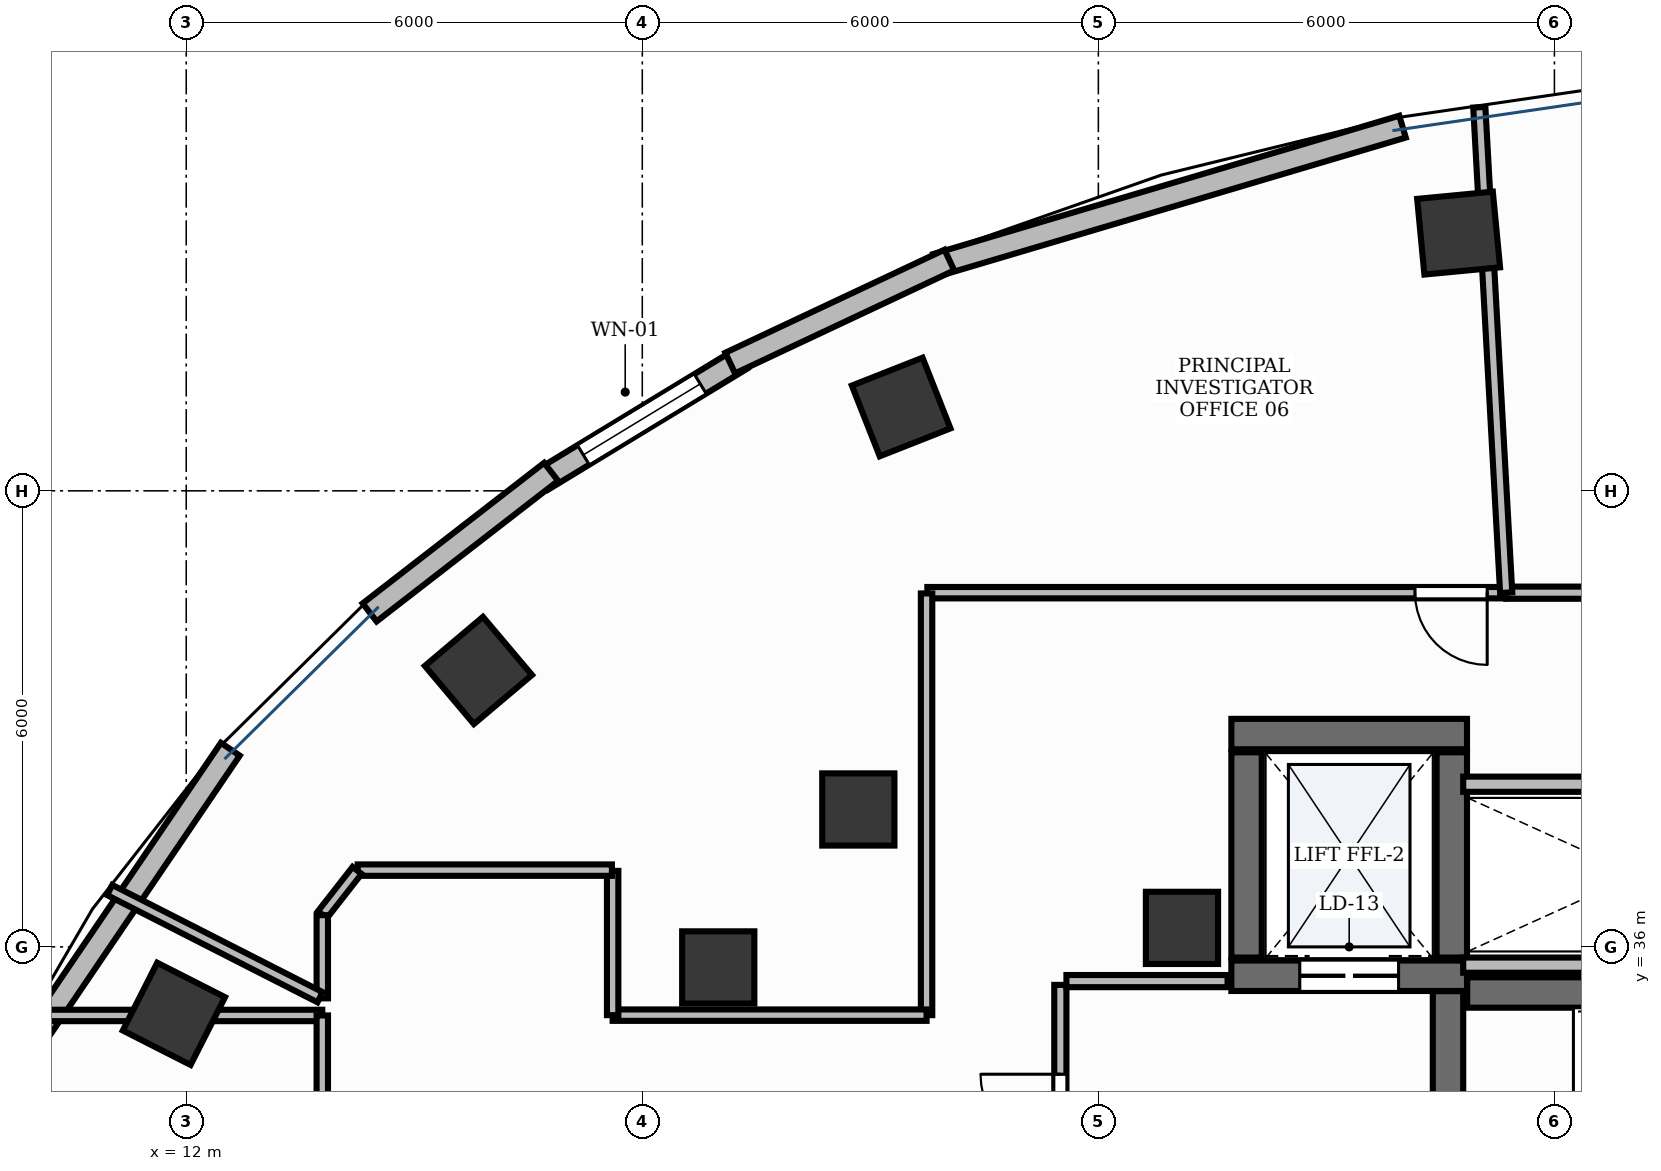
"""IFC4 building model, lengths in metres.
Left out: names, types, materials, properties, quantities, classifications, styles, units other than length and angle.
Written with IfcOpenShell. Run it as: python <this file> out.ifc"""

import sys

from ifc_helpers import new_model, si_unit, direction, frame, frame_2d, origin, origin_2d, place, context, subcontext, project, spatial, rectangle, extrude, element, fill, save


model = new_model("IFC4")
c1 = context("Model", 3, precision=1e-05, world=origin(), true_north=direction((0.0, 1.0)))
c2 = subcontext(c1, "Body", "Model", "MODEL_VIEW")
j1 = project(units=[si_unit("LENGTHUNIT", "METRE"), si_unit("PLANEANGLEUNIT", "RADIAN")], contexts=[c1])
p1 = place(None, origin())
s1 = spatial("IfcSite", under=j1, at=p1, CompositionType="ELEMENT")
p2 = place(p1, origin())
s2 = spatial("IfcBuilding", under=s1, at=p2, CompositionType="ELEMENT")
p3 = place(p2, frame((0.0, 0.0, 179.4)))
s3 = spatial("IfcBuildingStorey", under=s2, at=p3, CompositionType="ELEMENT", Elevation=179.4)
p4 = place(p3, frame((28.852, 35.4, 0.0), z_axis=(0.0, 0.0, 1.0), x_axis=(1.0, 0.0, 0.0)))
e1 = element("IfcWall", 1, at=p4, inside=s3, PredefinedType="SHEAR", context=c2, shape_type="SweptSolid", body=[
    extrude(rectangle(XDim=8.198, YDim=0.4, at=frame_2d((4.099, 0.0))), origin(), (0.0, 0.0, 1.0), 3.9),
])
p5 = place(p3, frame((28.6, 32.11, 0.0), z_axis=(0.0, 0.0, 1.0), x_axis=(0.0, 1.0, 0.0)))
e2 = element("IfcWall", 2, at=p5, inside=s3, PredefinedType="SHEAR", context=c2, shape_type="SweptSolid", body=[
    extrude(rectangle(XDim=3.308, YDim=0.4, at=frame_2d((1.654, 0.0))), origin(), (0.0, 0.0, 1.0), 3.9),
])
p6 = place(p5, frame((0.2, 0.0, 0.0)))
e3 = element("IfcOpeningElement", 3, at=p6, cuts=e2, PredefinedType="OPENING", context=c2, shape_type="SweptSolid", body=[
    extrude(rectangle(XDim=1.05, YDim=2.15, at=frame_2d((0.525, 1.075))), frame((0.0, 0.215, 0.0), z_axis=(0.0, -1.0, 0.0), x_axis=(1.0, 0.0, 0.0)), (0.0, 0.0, 1.0), 0.43),
])
p7 = place(p3, frame((25.75, 38.8, 0.0), z_axis=(0.0, 0.0, 1.0), x_axis=(1.0, 0.0, 0.0)))
e4 = element("IfcWall", 4, at=p7, inside=s3, PredefinedType="SHEAR", context=c2, shape_type="SweptSolid", body=[
    extrude(rectangle(XDim=3.1, YDim=0.4, at=frame_2d((1.55, 0.0))), origin(), (0.0, 0.0, 1.0), 3.9),
])
p8 = place(p3, frame((25.75, 35.62, 0.0), z_axis=(0.0, 0.0, 1.0), x_axis=(1.0, 0.0, 0.0)))
e5 = element("IfcWall", 5, at=p8, inside=s3, PredefinedType="SHEAR", context=c2, shape_type="SweptSolid", body=[
    extrude(rectangle(XDim=3.1, YDim=0.4, at=frame_2d((1.55, 0.0))), origin(), (0.0, 0.0, 1.0), 3.9),
])
p9 = place(p8, frame((0.9, 0.0, 0.0)))
e6 = element("IfcOpeningElement", 6, at=p9, cuts=e5, PredefinedType="OPENING", context=c2, shape_type="SweptSolid", body=[
    extrude(rectangle(XDim=1.3, YDim=2.2, at=frame_2d((0.65, 1.1))), frame((0.0, 0.215, 0.0), z_axis=(0.0, -1.0, 0.0), x_axis=(1.0, 0.0, 0.0)), (0.0, 0.0, 1.0), 0.43),
])
for number, where, z_axis, x_axis in (
    (7, (25.95, 35.86, 0.0), (0.0, 0.0, 1.0), (0.0, 1.0, 0.0)),
    (8, (28.65, 35.86, 0.0), (0.0, 0.0, 1.0), (0.0, 1.0, 0.0)),
):
    element("IfcWall", number, at=place(p3, frame(where, z_axis=z_axis, x_axis=x_axis)), inside=s3, PredefinedType="SHEAR", context=c2, shape_type="SweptSolid", body=[
        extrude(rectangle(XDim=2.7, YDim=0.4, at=frame_2d((1.35, 0.0))), origin(), (0.0, 0.0, 1.0), 3.9),
    ])
p10 = place(p3, frame((25.1, 36.25, -0.0), z_axis=(0.0, 0.0, 1.0), x_axis=(1.0, 0.0, 0.0)))
e9 = element("IfcColumn", 9, at=p10, inside=s3, PredefinedType="PILASTER", context=c2, shape_type="SweptSolid", body=[
    extrude(rectangle(XDim=0.95, YDim=0.95, at=origin_2d()), origin(), (0.0, 0.0, 1.0), 3.901),
])
for number, where, z_axis, x_axis in (
    (10, (28.74, 45.39, -0.0), (0.0, 0.0, 1.0), (0.995, 0.095, 0.0)),
    (11, (21.406, 43.103, -0.0), (0.0, 0.0, 1.0), (0.93, 0.367, 0.0)),
    (12, (15.844, 39.637, -0.0), (0.0, 0.0, 1.0), (0.764, 0.645, 0.0)),
):
    element("IfcColumn", number, at=place(p3, frame(where, z_axis=z_axis, x_axis=x_axis)), inside=s3, PredefinedType="COLUMN", context=c2, shape_type="SweptSolid", body=[
        extrude(rectangle(XDim=1.0, YDim=1.0, at=origin_2d()), origin(), (0.0, 0.0, 1.0), 3.901),
    ])
p11 = place(p3, frame((20.842, 37.808, -0.0), z_axis=(0.0, 0.0, 1.0), x_axis=(1.0, 0.0, 0.0)))
e13 = element("IfcColumn", 13, at=p11, inside=s3, PredefinedType="COLUMN", context=c2, shape_type="SweptSolid", body=[
    extrude(rectangle(XDim=0.95, YDim=0.95, at=origin_2d()), origin(), (0.0, 0.0, 1.0), 3.901),
])
p12 = place(p3, frame((11.838, 35.119, -0.0), z_axis=(0.0, 0.0, 1.0), x_axis=(0.453057191132, 0.891481453292, 0.0)))
e14 = element("IfcColumn", 14, at=p12, inside=s3, PredefinedType="COLUMN", context=c2, shape_type="SweptSolid", body=[
    extrude(rectangle(XDim=1.0, YDim=1.0, at=origin_2d()), origin(), (0.0, 0.0, 1.0), 3.901),
])
p13 = place(p3, frame((19.0, 35.73, -0.0), z_axis=(0.0, 0.0, 1.0), x_axis=(1.0, 0.0, 0.0)))
e15 = element("IfcColumn", 15, at=p13, inside=s3, PredefinedType="COLUMN", context=c2, shape_type="SweptSolid", body=[
    extrude(rectangle(XDim=0.95, YDim=0.95, at=origin_2d()), origin(), (0.0, 0.0, 1.0), 3.901),
])
p14 = place(p3, frame((19.303, 43.736, 0.0), z_axis=(0.0, 0.0, 1.0), x_axis=(-0.85455658592, -0.519358297769, 0.0)))
e16 = element("IfcWall", 16, at=p14, inside=s3, PredefinedType="STANDARD", context=c2, shape_type="SweptSolid", body=[
    extrude(rectangle(XDim=3.066, YDim=0.3, at=frame_2d((1.533, 0.0))), origin(), (0.0, 0.0, 1.0), 3.9),
])
p15 = place(p14, frame((0.633, 0.0, 0.9)))
e17 = element("IfcOpeningElement", 17, at=p15, cuts=e16, PredefinedType="OPENING", context=c2, shape_type="SweptSolid", body=[
    extrude(rectangle(XDim=1.8, YDim=2.1, at=frame_2d((0.9, 1.05))), frame((0.0, 0.165, 0.0), z_axis=(0.0, -1.0, 0.0), x_axis=(1.0, 0.0, 0.0)), (0.0, 0.0, 1.0), 0.33),
])
p16 = place(p3, frame((28.002, 46.791, 0.0), z_axis=(0.0, 0.0, 1.0), x_axis=(-0.958672086524, -0.284513322218, 0.0)))
e18 = element("IfcWall", 18, at=p16, inside=s3, PredefinedType="STANDARD", context=c2, shape_type="SweptSolid", body=[
    extrude(rectangle(XDim=6.396, YDim=0.3, at=frame_2d((3.198, 0.0))), origin(), (0.0, 0.0, 1.0), 3.9),
])
p17 = place(p3, frame((22.04, 45.036, 0.0), z_axis=(0.0, 0.0, 1.0), x_axis=(-0.90504435143, -0.425317201561, 0.0)))
e19 = element("IfcWall", 19, at=p17, inside=s3, PredefinedType="STANDARD", context=c2, shape_type="SweptSolid", body=[
    extrude(rectangle(XDim=3.186, YDim=0.3, at=frame_2d((1.593, 0.0))), origin(), (0.0, 0.0, 1.0), 3.9),
])
p18 = place(p3, frame((16.8, 42.25, 0.0), z_axis=(0.0, 0.0, 1.0), x_axis=(-0.790530517055, -0.612422649488, 0.0)))
e20 = element("IfcWall", 20, at=p18, inside=s3, PredefinedType="STANDARD", context=c2, shape_type="SweptSolid", body=[
    extrude(rectangle(XDim=3.02, YDim=0.3, at=frame_2d((1.51, 0.0))), origin(), (0.0, 0.0, 1.0), 3.9),
])
p19 = place(p3, frame((12.58, 38.601, 0.0), z_axis=(0.0, 0.0, 1.0), x_axis=(-0.561663900064, -0.827365495634, 0.0)))
e21 = element("IfcWall", 21, at=p19, inside=s3, PredefinedType="STANDARD", context=c2, shape_type="SweptSolid", body=[
    extrude(rectangle(XDim=5.438, YDim=0.3, at=frame_2d((2.719, 0.0))), origin(), (0.0, 0.0, 1.0), 3.47),
])
for number, where, z_axis, x_axis in (
    (22, (28.8, 35.76, 0.0), (0.0, 0.0, 1.0), (1.0, 0.0, 0.0)),
    (23, (28.8, 38.14, 0.0), (0.0, 0.0, 1.0), (1.0, 0.0, 0.0)),
):
    element("IfcWall", number, at=place(p3, frame(where, z_axis=z_axis, x_axis=x_axis)), inside=s3, PredefinedType="PARTITIONING", context=c2, shape_type="SweptSolid", body=[
        extrude(rectangle(XDim=4.57, YDim=0.2, at=frame_2d((2.285, 0.0))), origin(), (0.0, 0.0, 1.0), 2.91),
    ])
p20 = place(p3, frame((23.5, 32.1, 0.0), z_axis=(0.0, 0.0, 1.0), x_axis=(0.0, 1.0, 0.0)))
e24 = element("IfcWall", 24, at=p20, inside=s3, PredefinedType="PARTITIONING", context=c2, shape_type="SweptSolid", body=[
    extrude(rectangle(XDim=3.4, YDim=0.16, at=frame_2d((1.7, 0.0))), origin(), (0.0, 0.0, 1.0), 2.91),
])
p21 = place(p20, frame((1.175, 0.0, 0.0)))
e25 = element("IfcOpeningElement", 25, at=p21, cuts=e24, PredefinedType="OPENING", context=c2, shape_type="SweptSolid", body=[
    extrude(rectangle(XDim=1.05, YDim=2.15, at=frame_2d((0.525, 1.075))), frame((0.0, 0.095, 0.0), z_axis=(0.0, -1.0, 0.0), x_axis=(1.0, 0.0, 0.0)), (0.0, 0.0, 1.0), 0.19),
])
p22 = place(p3, frame((23.58, 35.55, 0.0), z_axis=(0.0, 0.0, 1.0), x_axis=(1.0, 0.0, 0.0)))
e26 = element("IfcWall", 26, at=p22, inside=s3, PredefinedType="PARTITIONING", context=c2, shape_type="SweptSolid", body=[
    extrude(rectangle(XDim=2.12, YDim=0.16, at=frame_2d((1.06, 0.0))), origin(), (0.0, 0.0, 1.0), 2.91),
])
p23 = place(p3, frame((36.385, 40.66, 0.0), z_axis=(0.0, 0.0, 1.0), x_axis=(-1.0, 0.0, 0.0)))
e27 = element("IfcWall", 27, at=p23, inside=s3, PredefinedType="PARTITIONING", context=c2, shape_type="SweptSolid", body=[
    extrude(rectangle(XDim=7.019, YDim=0.16, at=frame_2d((3.51, 0.0))), origin(), (0.0, 0.0, 1.0), 2.91),
])
p24 = place(p23, frame((1.217, 0.0, 0.0)))
e28 = element("IfcOpeningElement", 28, at=p24, cuts=e27, PredefinedType="OPENING", context=c2, shape_type="SweptSolid", body=[
    extrude(rectangle(XDim=0.95, YDim=2.15, at=frame_2d((0.475, 1.075))), frame((0.0, 0.095, 0.0), z_axis=(0.0, -1.0, 0.0), x_axis=(1.0, 0.0, 0.0)), (0.0, 0.0, 1.0), 0.19),
])
p25 = place(p3, frame((29.355, 40.66, 0.0), z_axis=(0.0, 0.0, 1.0), x_axis=(-1.0, 0.0, 0.0)))
e29 = element("IfcWall", 29, at=p25, inside=s3, PredefinedType="PARTITIONING", context=c2, shape_type="SweptSolid", body=[
    extrude(rectangle(XDim=7.605, YDim=0.15, at=frame_2d((3.803, 0.0))), origin(), (0.0, 0.0, 1.0), 2.91),
])
p26 = place(p25, frame((0.24, 0.0, 0.0)))
e30 = element("IfcOpeningElement", 30, at=p26, cuts=e29, PredefinedType="OPENING", context=c2, shape_type="SweptSolid", body=[
    extrude(rectangle(XDim=0.95, YDim=2.15, at=frame_2d((0.475, 1.075))), frame((0.0, 0.09, 0.0), z_axis=(0.0, -1.0, 0.0), x_axis=(1.0, 0.0, 0.0)), (0.0, 0.0, 1.0), 0.18),
])
p27 = place(p3, frame((10.016, 35.098, 0.0), z_axis=(0.0, 0.0, 1.0), x_axis=(1.0, 0.0, 0.0)))
e31 = element("IfcWall", 31, at=p27, inside=s3, PredefinedType="PARTITIONING", context=c2, shape_type="SweptSolid", body=[
    extrude(rectangle(XDim=3.774, YDim=0.15, at=frame_2d((1.887, 0.0))), origin(), (0.0, 0.0, 1.0), 2.91),
])
p28 = place(p3, frame((13.79, 35.098, 0.0), z_axis=(0.0, 0.0, 1.0), x_axis=(0.0, -1.0, 0.0)))
e32 = element("IfcWall", 32, at=p28, inside=s3, PredefinedType="PARTITIONING", context=c2, shape_type="SweptSolid", body=[
    extrude(rectangle(XDim=3.088, YDim=0.15, at=frame_2d((1.544, 0.0))), origin(), (0.0, 0.0, 1.0), 2.91),
])
p29 = place(p3, frame((29.365, 40.66, 0.0), z_axis=(0.0, 0.0, 1.0), x_axis=(-0.055309349604, 0.99846926635, 0.0)))
e33 = element("IfcWall", 33, at=p29, inside=s3, PredefinedType="PARTITIONING", context=c2, shape_type="SweptSolid", body=[
    extrude(rectangle(XDim=6.396, YDim=0.16, at=frame_2d((3.198, 0.0))), origin(), (0.0, 0.0, 1.0), 2.91),
])
p30 = place(p3, frame((21.74, 40.65, 0.0), z_axis=(0.0, 0.0, 1.0), x_axis=(0.0, -1.0, 0.0)))
e34 = element("IfcWall", 34, at=p30, inside=s3, PredefinedType="PARTITIONING", context=c2, shape_type="SweptSolid", body=[
    extrude(rectangle(XDim=5.548, YDim=0.15, at=frame_2d((2.774, 0.0))), origin(), (0.0, 0.0, 1.0), 2.91),
])
p31 = place(p3, frame((21.74, 35.102, 0.0), z_axis=(0.0, 0.0, 1.0), x_axis=(-1.0, 0.0, 0.0)))
e35 = element("IfcWall", 35, at=p31, inside=s3, PredefinedType="PARTITIONING", context=c2, shape_type="SweptSolid", body=[
    extrude(rectangle(XDim=4.13, YDim=0.15, at=frame_2d((2.065, 0.0))), origin(), (0.0, 0.0, 1.0), 2.91),
])
p32 = place(p3, frame((17.61, 35.102, 0.0), z_axis=(0.0, 0.0, 1.0), x_axis=(0.0, 1.0, 0.0)))
e36 = element("IfcWall", 36, at=p32, inside=s3, PredefinedType="PARTITIONING", context=c2, shape_type="SweptSolid", body=[
    extrude(rectangle(XDim=1.898, YDim=0.15, at=frame_2d((0.949, 0.0))), origin(), (0.0, 0.0, 1.0), 2.91),
])
p33 = place(p3, frame((17.6, 37.01, 0.0), z_axis=(0.0, 0.0, 1.0), x_axis=(-1.0, 0.0, 0.0)))
e37 = element("IfcWall", 37, at=p33, inside=s3, PredefinedType="PARTITIONING", context=c2, shape_type="SweptSolid", body=[
    extrude(rectangle(XDim=3.345, YDim=0.15, at=frame_2d((1.672, 0.0))), origin(), (0.0, 0.0, 1.0), 2.91),
])
p34 = place(p3, frame((14.248, 37.006, 0.0), z_axis=(0.0, 0.0, 1.0), x_axis=(-0.616041172792, -0.787713954063, 0.0)))
e38 = element("IfcWall", 38, at=p34, inside=s3, PredefinedType="PARTITIONING", context=c2, shape_type="SweptSolid", body=[
    extrude(rectangle(XDim=0.74, YDim=0.15, at=frame_2d((0.37, 0.0))), origin(), (0.0, 0.0, 1.0), 2.91),
])
p35 = place(p3, frame((13.79, 36.417, 0.0), z_axis=(0.0, 0.0, 1.0), x_axis=(0.0, -1.0, 0.0)))
e39 = element("IfcWall", 39, at=p35, inside=s3, PredefinedType="PARTITIONING", context=c2, shape_type="SweptSolid", body=[
    extrude(rectangle(XDim=1.094, YDim=0.15, at=frame_2d((0.547, 0.0))), origin(), (0.0, 0.0, 1.0), 2.91),
])
p36 = place(p3, frame((13.76, 35.338, 0.0), z_axis=(0.0, 0.0, 1.0), x_axis=(-0.890989702295, 0.454023513053, 0.0)))
e40 = element("IfcWall", 40, at=p36, inside=s3, PredefinedType="PARTITIONING", context=c2, shape_type="SweptSolid", body=[
    extrude(rectangle(XDim=3.106, YDim=0.15, at=frame_2d((1.553, 0.0))), origin(), (0.0, 0.0, 1.0), 2.91),
])
p37 = place(p15, origin())
e41 = element("IfcWindow", 41, at=p37, inside=s3, PartitioningType="SINGLE_PANEL", PredefinedType="WINDOW", context=c2, shape_type="SweptSolid", body=[
    extrude(rectangle(XDim=1.8, YDim=2.1, at=frame_2d((0.9, 1.05))), frame((0.0, 0.03, 0.0), z_axis=(0.0, -1.0, 0.0), x_axis=(1.0, 0.0, 0.0)), (0.0, 0.0, 1.0), 0.06),
])
fill(e17, e41)
p38 = place(p9, origin())
e42 = element("IfcDoor", 42, at=p38, inside=s3, OperationType="DOUBLE_DOOR_SLIDING", PredefinedType="DOOR", context=c2, shape_type="SweptSolid", body=[
    extrude(rectangle(XDim=1.3, YDim=2.2, at=frame_2d((0.65, 1.1))), frame((0.0, 0.025, 0.0), z_axis=(0.0, -1.0, 0.0), x_axis=(1.0, 0.0, 0.0)), (0.0, 0.0, 1.0), 0.05),
])
fill(e6, e42)
p39 = place(p21, origin())
e43 = element("IfcDoor", 43, at=p39, inside=s3, OperationType="SINGLE_SWING_RIGHT", PredefinedType="DOOR", context=c2, shape_type="SweptSolid", body=[
    extrude(rectangle(XDim=1.05, YDim=2.15, at=frame_2d((0.525, 1.075))), frame((0.0, 0.025, 0.0), z_axis=(0.0, -1.0, 0.0), x_axis=(1.0, 0.0, 0.0)), (0.0, 0.0, 1.0), 0.05),
])
fill(e25, e43)
p40 = place(p26, origin())
e44 = element("IfcDoor", 44, at=p40, inside=s3, OperationType="SINGLE_SWING_LEFT", PredefinedType="DOOR", context=c2, shape_type="SweptSolid", body=[
    extrude(rectangle(XDim=0.95, YDim=2.15, at=frame_2d((0.475, 1.075))), frame((0.0, 0.025, 0.0), z_axis=(0.0, -1.0, 0.0), x_axis=(1.0, 0.0, 0.0)), (0.0, 0.0, 1.0), 0.05),
])
fill(e30, e44)
save(model, sys.argv[1])
